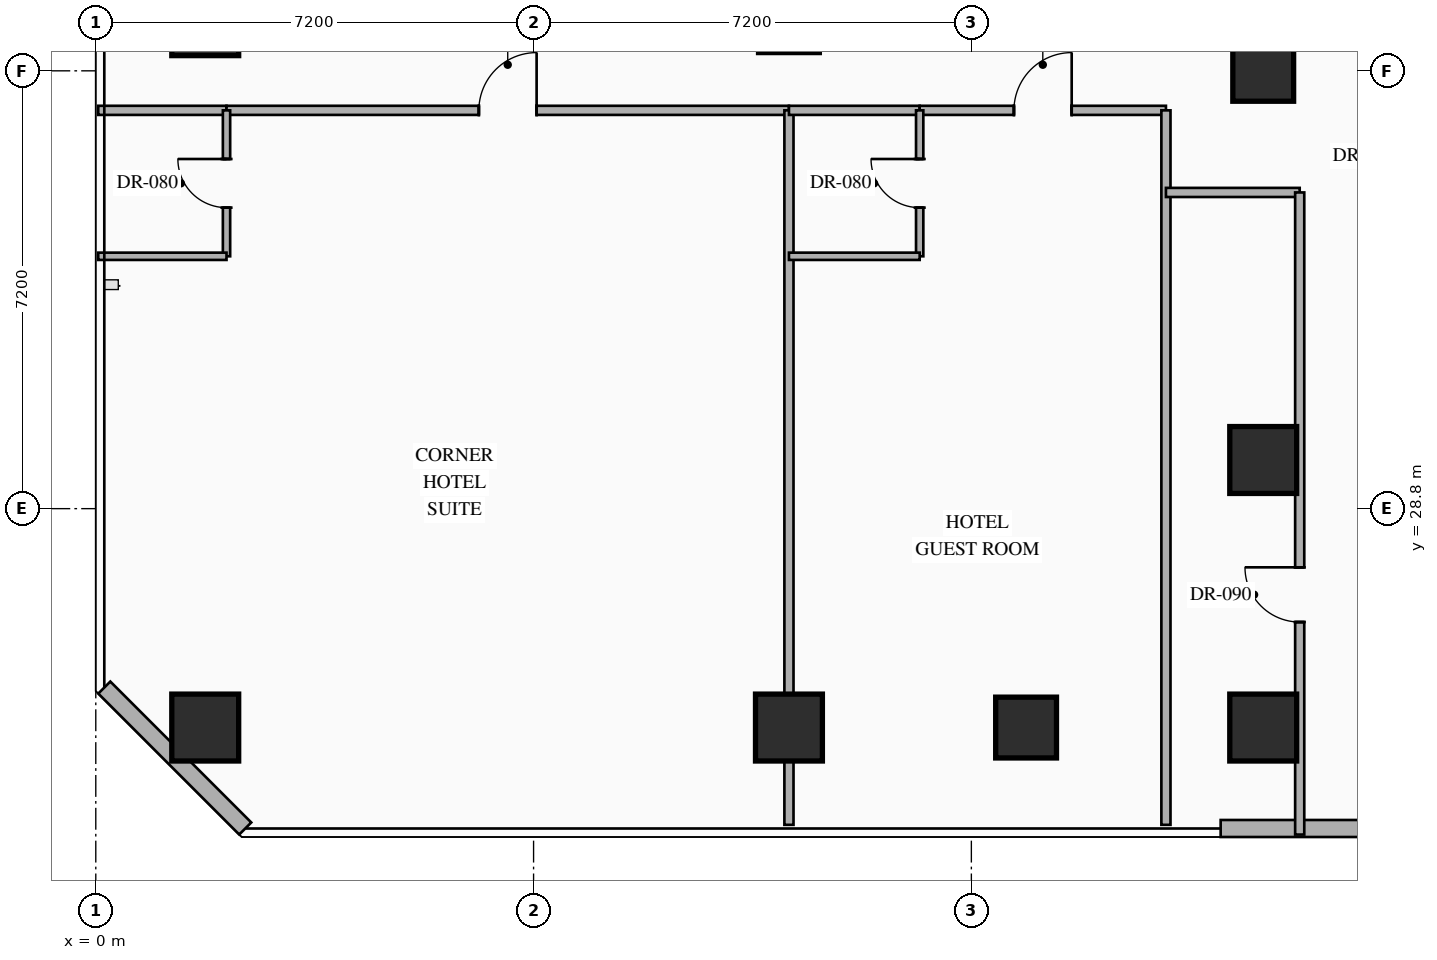
"""IFC4 building model, lengths in metres.
Left out: names, types, materials, properties, quantities, classifications, styles, units other than length and angle.
Written with IfcOpenShell. Run it as: python <this file> out.ifc"""

import sys

from ifc_helpers import new_model, si_unit, direction, frame, frame_2d, origin, origin_2d, place, context, subcontext, project, spatial, rectangle, hollow_rectangle, extrude, element, fill, save


model = new_model("IFC4")
c1 = context("Model", 3, precision=1e-05, world=origin(), true_north=direction((0.0, 1.0)))
c2 = subcontext(c1, "Body", "Model", "MODEL_VIEW")
j1 = project(units=[si_unit("LENGTHUNIT", "METRE"), si_unit("PLANEANGLEUNIT", "RADIAN")], contexts=[c1])
p1 = place(None, origin())
s1 = spatial("IfcSite", under=j1, at=p1, CompositionType="ELEMENT")
p2 = place(p1, origin())
s2 = spatial("IfcBuilding", under=s1, at=p2, CompositionType="ELEMENT")
p3 = place(p2, frame((0.0, 0.0, 39.95)))
s3 = spatial("IfcBuildingStorey", under=s2, at=p3, CompositionType="ELEMENT", Elevation=39.95)
for number, where, z_axis, x_axis in (
    (1, (1.8, 25.2, 0.0), (0.0, 0.0, 1.0), (1.0, 0.0, 0.0)),
    (2, (1.8, 36.8, 0.0), (0.0, 0.0, 1.0), (1.0, 0.0, 0.0)),
    (3, (11.4, 25.2, 0.0), (0.0, 0.0, 1.0), (1.0, 0.0, 0.0)),
    (4, (19.2, 25.2, 0.0), (0.0, 0.0, 1.0), (1.0, 0.0, 0.0)),
    (5, (19.2, 29.6, 0.0), (0.0, 0.0, 1.0), (1.0, 0.0, 0.0)),
):
    element("IfcColumn", number, at=place(p3, frame(where, z_axis=z_axis, x_axis=x_axis)), inside=s3, PredefinedType="COLUMN", context=c2, shape_type="SweptSolid", body=[
        extrude(hollow_rectangle(XDim=1.1, YDim=1.1, WallThickness=0.04, at=origin_2d()), origin(), (0.0, 0.0, 1.0), 3.35),
    ])
for number, where, z_axis, x_axis in (
    (6, (19.2, 36.0, 0.0), (0.0, 0.0, 1.0), (1.0, 0.0, 0.0)),
    (7, (15.3, 25.2, 0.0), (0.0, 0.0, 1.0), (1.0, 0.0, 0.0)),
):
    element("IfcColumn", number, at=place(p3, frame(where, z_axis=z_axis, x_axis=x_axis)), inside=s3, PredefinedType="COLUMN", context=c2, shape_type="SweptSolid", body=[
        extrude(hollow_rectangle(XDim=1.0, YDim=1.0, WallThickness=0.038, at=origin_2d()), origin(), (0.0, 0.0, 1.0), 3.35),
    ])
p4 = place(p3, frame((25.247, 23.54, 0.0), z_axis=(0.0, 0.0, 1.0), x_axis=(-1.0, 0.0, 0.0)))
e8 = element("IfcWall", 8, at=p4, inside=s3, PredefinedType="STANDARD", context=c2, shape_type="SweptSolid", body=[
    extrude(rectangle(XDim=6.747, YDim=0.28, at=frame_2d((3.374, 0.0))), origin(), (0.0, 0.0, 1.0), 3.13),
])
p5 = place(p3, frame((2.458, 23.54, 0.0), z_axis=(0.0, 0.0, 1.0), x_axis=(-0.707144017911, 0.707069542501, 0.0)))
e9 = element("IfcWall", 9, at=p5, inside=s3, PredefinedType="STANDARD", context=c2, shape_type="SweptSolid", body=[
    extrude(rectangle(XDim=3.278, YDim=0.28, at=frame_2d((1.639, 0.0))), origin(), (0.0, 0.0, 1.0), 3.13),
])
p6 = place(p3, frame((0.04, 35.35, 0.0), z_axis=(0.0, 0.0, 1.0), x_axis=(1.0, 0.0, 0.0)))
e10 = element("IfcWall", 10, at=p6, inside=s3, PredefinedType="PARTITIONING", context=c2, shape_type="SweptSolid", body=[
    extrude(rectangle(XDim=2.11, YDim=0.15, at=frame_2d((1.055, 0.0))), origin(), (0.0, 0.0, 1.0), 3.13),
])
p7 = place(p3, frame((2.15, 35.35, 0.0), z_axis=(0.0, 0.0, 1.0), x_axis=(1.0, 0.0, 0.0)))
e11 = element("IfcWall", 11, at=p7, inside=s3, PredefinedType="PARTITIONING", context=c2, shape_type="SweptSolid", body=[
    extrude(rectangle(XDim=9.25, YDim=0.15, at=frame_2d((4.625, 0.0))), origin(), (0.0, 0.0, 1.0), 3.13),
])
p8 = place(p7, frame((4.15, 0.0, 0.0)))
e12 = element("IfcOpeningElement", 12, at=p8, cuts=e11, PredefinedType="OPENING", context=c2, shape_type="SweptSolid", body=[
    extrude(rectangle(XDim=0.95, YDim=2.15, at=frame_2d((0.475, 1.075))), frame((0.0, 0.085, 0.0), z_axis=(0.0, -1.0, 0.0), x_axis=(1.0, 0.0, 0.0)), (0.0, 0.0, 1.0), 0.17),
])
p9 = place(p3, frame((2.15, 32.95, 0.0), z_axis=(0.0, 0.0, 1.0), x_axis=(0.0, 1.0, 0.0)))
e13 = element("IfcWall", 13, at=p9, inside=s3, PredefinedType="PARTITIONING", context=c2, shape_type="SweptSolid", body=[
    extrude(rectangle(XDim=2.4, YDim=0.12, at=frame_2d((1.2, 0.0))), origin(), (0.0, 0.0, 1.0), 3.13),
])
p10 = place(p9, frame((0.8, 0.0, 0.0)))
e14 = element("IfcOpeningElement", 14, at=p10, cuts=e13, PredefinedType="OPENING", context=c2, shape_type="SweptSolid", body=[
    extrude(rectangle(XDim=0.8, YDim=2.06, at=frame_2d((0.4, 1.03))), frame((0.0, 0.07, 0.0), z_axis=(0.0, -1.0, 0.0), x_axis=(1.0, 0.0, 0.0)), (0.0, 0.0, 1.0), 0.14),
])
p11 = place(p3, frame((0.04, 32.95, 0.0), z_axis=(0.0, 0.0, 1.0), x_axis=(1.0, 0.0, 0.0)))
e15 = element("IfcWall", 15, at=p11, inside=s3, PredefinedType="PARTITIONING", context=c2, shape_type="SweptSolid", body=[
    extrude(rectangle(XDim=2.11, YDim=0.12, at=frame_2d((1.055, 0.0))), origin(), (0.0, 0.0, 1.0), 3.13),
])
p12 = place(p3, frame((11.4, 23.6, 0.0), z_axis=(0.0, 0.0, 1.0), x_axis=(0.0, 1.0, 0.0)))
e16 = element("IfcWall", 16, at=p12, inside=s3, PredefinedType="PARTITIONING", context=c2, shape_type="SweptSolid", body=[
    extrude(rectangle(XDim=11.75, YDim=0.15, at=frame_2d((5.875, 0.0))), origin(), (0.0, 0.0, 1.0), 2.425),
])
p13 = place(p3, frame((11.4, 35.35, 0.0), z_axis=(0.0, 0.0, 1.0), x_axis=(1.0, 0.0, 0.0)))
e17 = element("IfcWall", 17, at=p13, inside=s3, PredefinedType="PARTITIONING", context=c2, shape_type="SweptSolid", body=[
    extrude(rectangle(XDim=2.15, YDim=0.15, at=frame_2d((1.075, 0.0))), origin(), (0.0, 0.0, 1.0), 3.13),
])
p14 = place(p3, frame((13.55, 35.35, 0.0), z_axis=(0.0, 0.0, 1.0), x_axis=(1.0, 0.0, 0.0)))
e18 = element("IfcWall", 18, at=p14, inside=s3, PredefinedType="PARTITIONING", context=c2, shape_type="SweptSolid", body=[
    extrude(rectangle(XDim=4.05, YDim=0.15, at=frame_2d((2.025, 0.0))), origin(), (0.0, 0.0, 1.0), 3.13),
])
p15 = place(p14, frame((1.55, 0.0, 0.0)))
e19 = element("IfcOpeningElement", 19, at=p15, cuts=e18, PredefinedType="OPENING", context=c2, shape_type="SweptSolid", body=[
    extrude(rectangle(XDim=0.95, YDim=2.15, at=frame_2d((0.475, 1.075))), frame((0.0, 0.085, 0.0), z_axis=(0.0, -1.0, 0.0), x_axis=(1.0, 0.0, 0.0)), (0.0, 0.0, 1.0), 0.17),
])
p16 = place(p3, frame((13.55, 32.95, 0.0), z_axis=(0.0, 0.0, 1.0), x_axis=(0.0, 1.0, 0.0)))
e20 = element("IfcWall", 20, at=p16, inside=s3, PredefinedType="PARTITIONING", context=c2, shape_type="SweptSolid", body=[
    extrude(rectangle(XDim=2.4, YDim=0.12, at=frame_2d((1.2, 0.0))), origin(), (0.0, 0.0, 1.0), 3.13),
])
p17 = place(p16, frame((0.8, 0.0, 0.0)))
e21 = element("IfcOpeningElement", 21, at=p17, cuts=e20, PredefinedType="OPENING", context=c2, shape_type="SweptSolid", body=[
    extrude(rectangle(XDim=0.8, YDim=2.06, at=frame_2d((0.4, 1.03))), frame((0.0, 0.07, 0.0), z_axis=(0.0, -1.0, 0.0), x_axis=(1.0, 0.0, 0.0)), (0.0, 0.0, 1.0), 0.14),
])
p18 = place(p3, frame((11.4, 32.95, 0.0), z_axis=(0.0, 0.0, 1.0), x_axis=(1.0, 0.0, 0.0)))
e22 = element("IfcWall", 22, at=p18, inside=s3, PredefinedType="PARTITIONING", context=c2, shape_type="SweptSolid", body=[
    extrude(rectangle(XDim=2.15, YDim=0.12, at=frame_2d((1.075, 0.0))), origin(), (0.0, 0.0, 1.0), 3.13),
])
p19 = place(p3, frame((17.6, 23.6, 0.0), z_axis=(0.0, 0.0, 1.0), x_axis=(0.0, 1.0, 0.0)))
e23 = element("IfcWall", 23, at=p19, inside=s3, PredefinedType="PARTITIONING", context=c2, shape_type="SweptSolid", body=[
    extrude(rectangle(XDim=11.75, YDim=0.15, at=frame_2d((5.875, 0.0))), origin(), (0.0, 0.0, 1.0), 3.13),
])
p20 = place(p3, frame((17.6, 34.0, 0.0), z_axis=(0.0, 0.0, 1.0), x_axis=(1.0, 0.0, 0.0)))
e24 = element("IfcWall", 24, at=p20, inside=s3, PredefinedType="PARTITIONING", context=c2, shape_type="SweptSolid", body=[
    extrude(rectangle(XDim=2.2, YDim=0.15, at=frame_2d((1.1, 0.0))), origin(), (0.0, 0.0, 1.0), 3.13),
])
p21 = place(p3, frame((19.8, 23.44, 0.0), z_axis=(0.0, 0.0, 1.0), x_axis=(0.0, 1.0, 0.0)))
e25 = element("IfcWall", 25, at=p21, inside=s3, PredefinedType="PARTITIONING", context=c2, shape_type="SweptSolid", body=[
    extrude(rectangle(XDim=10.56, YDim=0.15, at=frame_2d((5.28, 0.0))), origin(), (0.0, 0.0, 1.0), 3.13),
])
p22 = place(p21, frame((3.495, 0.0, 0.0)))
e26 = element("IfcOpeningElement", 26, at=p22, cuts=e25, PredefinedType="OPENING", context=c2, shape_type="SweptSolid", body=[
    extrude(rectangle(XDim=0.9, YDim=2.15, at=frame_2d((0.45, 1.075))), frame((0.0, 0.085, 0.0), z_axis=(0.0, -1.0, 0.0), x_axis=(1.0, 0.0, 0.0)), (0.0, 0.0, 1.0), 0.17),
])
p23 = place(p8, origin())
e27 = element("IfcDoor", 27, at=p23, inside=s3, OperationType="SINGLE_SWING_RIGHT", PredefinedType="DOOR", context=c2, shape_type="SweptSolid", body=[
    extrude(rectangle(XDim=0.95, YDim=2.15, at=frame_2d((0.475, 1.075))), frame((0.0, 0.025, 0.0), z_axis=(0.0, -1.0, 0.0), x_axis=(1.0, 0.0, 0.0)), (0.0, 0.0, 1.0), 0.05),
])
fill(e12, e27)
p24 = place(p10, origin())
e28 = element("IfcDoor", 28, at=p24, inside=s3, OperationType="SINGLE_SWING_RIGHT", PredefinedType="DOOR", context=c2, shape_type="SweptSolid", body=[
    extrude(rectangle(XDim=0.8, YDim=2.06, at=frame_2d((0.4, 1.03))), frame((0.0, 0.025, 0.0), z_axis=(0.0, -1.0, 0.0), x_axis=(1.0, 0.0, 0.0)), (0.0, 0.0, 1.0), 0.05),
])
fill(e14, e28)
p25 = place(p15, origin())
e29 = element("IfcDoor", 29, at=p25, inside=s3, OperationType="SINGLE_SWING_RIGHT", PredefinedType="DOOR", context=c2, shape_type="SweptSolid", body=[
    extrude(rectangle(XDim=0.95, YDim=2.15, at=frame_2d((0.475, 1.075))), frame((0.0, 0.025, 0.0), z_axis=(0.0, -1.0, 0.0), x_axis=(1.0, 0.0, 0.0)), (0.0, 0.0, 1.0), 0.05),
])
fill(e19, e29)
p26 = place(p17, origin())
e30 = element("IfcDoor", 30, at=p26, inside=s3, OperationType="SINGLE_SWING_RIGHT", PredefinedType="DOOR", context=c2, shape_type="SweptSolid", body=[
    extrude(rectangle(XDim=0.8, YDim=2.06, at=frame_2d((0.4, 1.03))), frame((0.0, 0.025, 0.0), z_axis=(0.0, -1.0, 0.0), x_axis=(1.0, 0.0, 0.0)), (0.0, 0.0, 1.0), 0.05),
])
fill(e21, e30)
p27 = place(p22, origin())
e31 = element("IfcDoor", 31, at=p27, inside=s3, OperationType="SINGLE_SWING_RIGHT", PredefinedType="DOOR", context=c2, shape_type="SweptSolid", body=[
    extrude(rectangle(XDim=0.9, YDim=2.15, at=frame_2d((0.45, 1.075))), frame((0.0, 0.025, 0.0), z_axis=(0.0, -1.0, 0.0), x_axis=(1.0, 0.0, 0.0)), (0.0, 0.0, 1.0), 0.05),
])
fill(e26, e31)
save(model, sys.argv[1])
